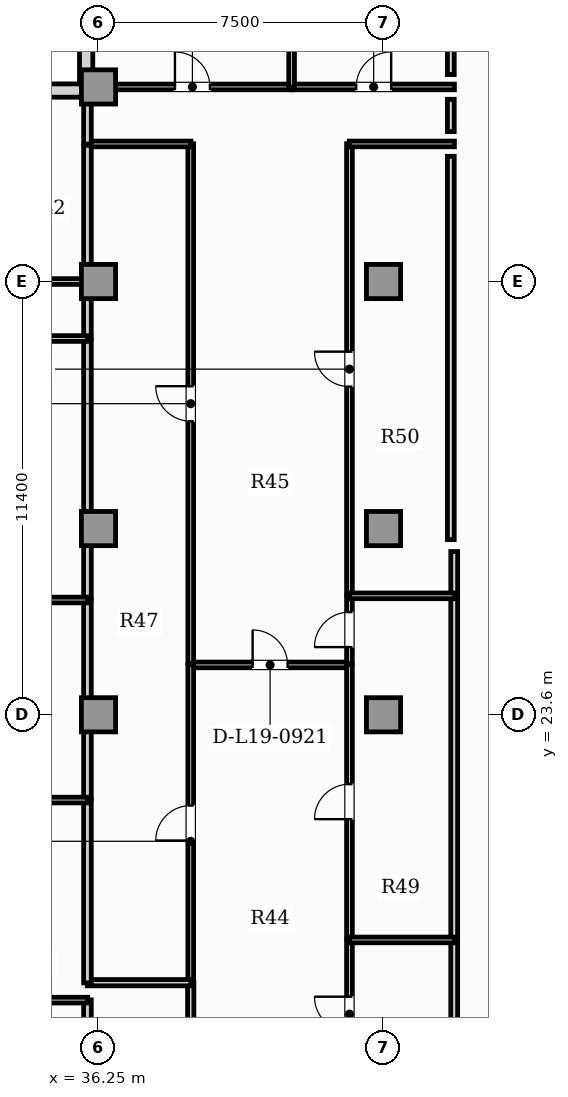
"""IFC4 building model, lengths in metres.
Left out: names, types, materials, properties, quantities, classifications, styles, units other than length and angle.
Written with IfcOpenShell. Run it as: python <this file> out.ifc"""

import sys

from ifc_helpers import new_model, si_unit, direction, frame, frame_2d, origin, origin_2d, place, context, subcontext, project, spatial, rectangle, extrude, element, fill, save


model = new_model("IFC4")
c1 = context("Model", 3, precision=1e-05, world=origin(), true_north=direction((0.0, 1.0)))
c2 = subcontext(c1, "Body", "Model", "MODEL_VIEW")
j1 = project(units=[si_unit("LENGTHUNIT", "METRE"), si_unit("PLANEANGLEUNIT", "RADIAN")], contexts=[c1])
p1 = place(None, origin())
s1 = spatial("IfcSite", under=j1, at=p1, CompositionType="ELEMENT")
p2 = place(p1, origin())
s2 = spatial("IfcBuilding", under=s1, at=p2, CompositionType="ELEMENT")
p3 = place(p2, frame((0.0, 0.0, 81.05)))
s3 = spatial("IfcBuildingStorey", under=s2, at=p3, CompositionType="ELEMENT", Elevation=81.05)
for number, where, z_axis, x_axis in (
    (1, (36.25, 23.6, 0.0), (0.0, 0.0, 1.0), (1.0, 0.0, 0.0)),
    (2, (43.75, 23.6, 0.0), (0.0, 0.0, 1.0), (1.0, 0.0, 0.0)),
    (3, (36.25, 28.5, 0.0), (0.0, 0.0, 1.0), (1.0, 0.0, 0.0)),
    (4, (43.75, 28.5, 0.0), (0.0, 0.0, 1.0), (1.0, 0.0, 0.0)),
    (5, (36.25, 40.12, 0.0), (0.0, 0.0, 1.0), (1.0, 0.0, 0.0)),
    (6, (36.25, 35.0, 0.0), (0.0, 0.0, 1.0), (1.0, 0.0, 0.0)),
    (7, (43.75, 35.0, 0.0), (0.0, 0.0, 1.0), (1.0, 0.0, 0.0)),
):
    element("IfcColumn", number, at=place(p3, frame(where, z_axis=z_axis, x_axis=x_axis)), inside=s3, PredefinedType="COLUMN", context=c2, shape_type="SweptSolid", body=[
        extrude(rectangle(XDim=0.9, YDim=0.9, at=origin_2d()), origin(), (0.0, 0.0, 1.0), 3.85),
    ])
p4 = place(p3, frame((35.925, 46.36, 0.0), z_axis=(0.0, 0.0, 1.0), x_axis=(0.0, -1.0, 0.0)))
e8 = element("IfcWall", 8, at=p4, inside=s3, PredefinedType="SOLIDWALL", context=c2, shape_type="SweptSolid", body=[
    extrude(rectangle(XDim=6.16, YDim=0.35, at=frame_2d((3.08, 0.0))), origin(), (0.0, 0.0, 1.0), 3.6),
])
p5 = place(p3, frame((34.25, 40.025, 0.0), z_axis=(0.0, 0.0, 1.0), x_axis=(1.0, 0.0, 0.0)))
e9 = element("IfcWall", 9, at=p5, inside=s3, PredefinedType="SOLIDWALL", context=c2, shape_type="SweptSolid", body=[
    extrude(rectangle(XDim=1.85, YDim=0.35, at=frame_2d((0.925, 0.0))), origin(), (0.0, 0.0, 1.0), 3.6),
])
p6 = place(p3, frame((45.61, 13.765, 0.0), z_axis=(0.0, 0.0, 1.0), x_axis=(0.0, 1.0, 0.0)))
e10 = element("IfcWall", 10, at=p6, inside=s3, PredefinedType="PARTITIONING", context=c2, shape_type="SweptSolid", body=[
    extrude(rectangle(XDim=3.916, YDim=0.18, at=frame_2d((1.958, 0.0))), origin(), (0.0, 0.0, 1.0), 3.6),
])
p7 = place(p3, frame((45.61, 17.711, 0.0), z_axis=(0.0, 0.0, 1.0), x_axis=(0.0, 1.0, 0.0)))
e11 = element("IfcWall", 11, at=p7, inside=s3, PredefinedType="PARTITIONING", context=c2, shape_type="SweptSolid", body=[
    extrude(rectangle(XDim=9.024, YDim=0.18, at=frame_2d((4.512, 0.0))), origin(), (0.0, 0.0, 1.0), 3.6),
])
p8 = place(p3, frame((45.61, 26.765, 0.0), z_axis=(0.0, 0.0, 1.0), x_axis=(0.0, 1.0, 0.0)))
e12 = element("IfcWall", 12, at=p8, inside=s3, PredefinedType="PARTITIONING", context=c2, shape_type="SweptSolid", body=[
    extrude(rectangle(XDim=1.13, YDim=0.18, at=frame_2d((0.565, 0.0))), origin(), (0.0, 0.0, 1.0), 3.6),
])
p9 = place(p3, frame((38.672, 24.912, 0.0), z_axis=(0.0, 0.0, 1.0), x_axis=(1.0, 0.0, 0.0)))
e13 = element("IfcWall", 13, at=p9, inside=s3, PredefinedType="PARTITIONING", context=c2, shape_type="SweptSolid", body=[
    extrude(rectangle(XDim=4.186, YDim=0.15, at=frame_2d((2.093, 0.0))), origin(), (0.0, 0.0, 1.0), 3.6),
])
p10 = place(p9, frame((1.633, 0.0, 0.0)))
e14 = element("IfcOpeningElement", 14, at=p10, cuts=e13, PredefinedType="OPENING", context=c2, shape_type="SweptSolid", body=[
    extrude(rectangle(XDim=0.92, YDim=2.1, at=frame_2d((0.46, 1.05))), frame((0.0, 0.085, 0.0), z_axis=(0.0, -1.0, 0.0), x_axis=(1.0, 0.0, 0.0)), (0.0, 0.0, 1.0), 0.17),
])
p11 = place(p3, frame((38.677, 13.765, 0.0), z_axis=(0.0, 0.0, 1.0), x_axis=(0.0, 1.0, 0.0)))
e15 = element("IfcWall", 15, at=p11, inside=s3, PredefinedType="PLUMBINGWALL", context=c2, shape_type="SweptSolid", body=[
    extrude(rectangle(XDim=2.792, YDim=0.165, at=frame_2d((1.396, 0.0))), origin(), (0.0, 0.0, 1.0), 3.6),
])
p12 = place(p11, frame((0.971, 0.0, 0.0)))
e16 = element("IfcOpeningElement", 16, at=p12, cuts=e15, PredefinedType="OPENING", context=c2, shape_type="SweptSolid", body=[
    extrude(rectangle(XDim=0.85, YDim=2.1, at=frame_2d((0.425, 1.05))), frame((0.0, 0.093, 0.0), z_axis=(0.0, -1.0, 0.0), x_axis=(1.0, 0.0, 0.0)), (0.0, 0.0, 1.0), 0.185),
])
p13 = place(p3, frame((38.677, 16.586, 0.0), z_axis=(0.0, 0.0, 1.0), x_axis=(0.0, 1.0, 0.0)))
e17 = element("IfcWall", 17, at=p13, inside=s3, PredefinedType="PARTITIONING", context=c2, shape_type="SweptSolid", body=[
    extrude(rectangle(XDim=8.331, YDim=0.15, at=frame_2d((4.166, 0.0))), origin(), (0.0, 0.0, 1.0), 3.6),
])
p14 = place(p13, frame((3.705, 0.0, 0.0)))
e18 = element("IfcOpeningElement", 18, at=p14, cuts=e17, PredefinedType="OPENING", context=c2, shape_type="SweptSolid", body=[
    extrude(rectangle(XDim=0.92, YDim=2.1, at=frame_2d((0.46, 1.05))), frame((0.0, 0.085, 0.0), z_axis=(0.0, -1.0, 0.0), x_axis=(1.0, 0.0, 0.0)), (0.0, 0.0, 1.0), 0.17),
])
p15 = place(p3, frame((42.854, 13.765, 0.0), z_axis=(0.0, 0.0, 1.0), x_axis=(0.0, 1.0, 0.0)))
e19 = element("IfcWall", 19, at=p15, inside=s3, PredefinedType="PARTITIONING", context=c2, shape_type="SweptSolid", body=[
    extrude(rectangle(XDim=3.916, YDim=0.15, at=frame_2d((1.958, 0.0))), origin(), (0.0, 0.0, 1.0), 3.6),
])
p16 = place(p15, frame((1.498, 0.0, 0.0)))
e20 = element("IfcOpeningElement", 20, at=p16, cuts=e19, PredefinedType="OPENING", context=c2, shape_type="SweptSolid", body=[
    extrude(rectangle(XDim=0.92, YDim=2.1, at=frame_2d((0.46, 1.05))), frame((0.0, 0.085, 0.0), z_axis=(0.0, -1.0, 0.0), x_axis=(1.0, 0.0, 0.0)), (0.0, 0.0, 1.0), 0.17),
])
p17 = place(p3, frame((42.854, 17.711, 0.0), z_axis=(0.0, 0.0, 1.0), x_axis=(0.0, 1.0, 0.0)))
e21 = element("IfcWall", 21, at=p17, inside=s3, PredefinedType="PARTITIONING", context=c2, shape_type="SweptSolid", body=[
    extrude(rectangle(XDim=7.206, YDim=0.15, at=frame_2d((3.603, 0.0))), origin(), (0.0, 0.0, 1.0), 3.6),
])
p18 = place(p17, frame((3.143, 0.0, 0.0)))
e22 = element("IfcOpeningElement", 22, at=p18, cuts=e21, PredefinedType="OPENING", context=c2, shape_type="SweptSolid", body=[
    extrude(rectangle(XDim=0.92, YDim=2.1, at=frame_2d((0.46, 1.05))), frame((0.0, 0.085, 0.0), z_axis=(0.0, -1.0, 0.0), x_axis=(1.0, 0.0, 0.0)), (0.0, 0.0, 1.0), 0.17),
])
p19 = place(p3, frame((38.677, 24.947, 0.0), z_axis=(0.0, 0.0, 1.0), x_axis=(0.0, 1.0, 0.0)))
e23 = element("IfcWall", 23, at=p19, inside=s3, PredefinedType="PARTITIONING", context=c2, shape_type="SweptSolid", body=[
    extrude(rectangle(XDim=13.678, YDim=0.15, at=frame_2d((6.839, 0.0))), origin(), (0.0, 0.0, 1.0), 3.6),
])
p20 = place(p19, frame((6.379, 0.0, 0.0)))
e24 = element("IfcOpeningElement", 24, at=p20, cuts=e23, PredefinedType="OPENING", context=c2, shape_type="SweptSolid", body=[
    extrude(rectangle(XDim=0.92, YDim=2.1, at=frame_2d((0.46, 1.05))), frame((0.0, 0.085, 0.0), z_axis=(0.0, -1.0, 0.0), x_axis=(1.0, 0.0, 0.0)), (0.0, 0.0, 1.0), 0.17),
])
p21 = place(p3, frame((35.955, 38.62, 0.0), z_axis=(0.0, 0.0, 1.0), x_axis=(1.0, 0.0, 0.0)))
e25 = element("IfcWall", 25, at=p21, inside=s3, PredefinedType="PARTITIONING", context=c2, shape_type="SweptSolid", body=[
    extrude(rectangle(XDim=2.727, YDim=0.15, at=frame_2d((1.364, 0.0))), origin(), (0.0, 0.0, 1.0), 3.6),
])
p22 = place(p3, frame((42.854, 24.947, 0.0), z_axis=(0.0, 0.0, 1.0), x_axis=(0.0, 1.0, 0.0)))
e26 = element("IfcWall", 26, at=p22, inside=s3, PredefinedType="PARTITIONING", context=c2, shape_type="SweptSolid", body=[
    extrude(rectangle(XDim=1.788, YDim=0.15, at=frame_2d((0.894, 0.0))), origin(), (0.0, 0.0, 1.0), 3.6),
])
p23 = place(p22, frame((0.434, 0.0, 0.0)))
e27 = element("IfcOpeningElement", 27, at=p23, cuts=e26, PredefinedType="OPENING", context=c2, shape_type="SweptSolid", body=[
    extrude(rectangle(XDim=0.92, YDim=2.1, at=frame_2d((0.46, 1.05))), frame((0.0, 0.085, 0.0), z_axis=(0.0, -1.0, 0.0), x_axis=(1.0, 0.0, 0.0)), (0.0, 0.0, 1.0), 0.17),
])
p24 = place(p3, frame((42.854, 26.765, 0.0), z_axis=(0.0, 0.0, 1.0), x_axis=(0.0, 1.0, 0.0)))
e28 = element("IfcWall", 28, at=p24, inside=s3, PredefinedType="PARTITIONING", context=c2, shape_type="SweptSolid", body=[
    extrude(rectangle(XDim=11.86, YDim=0.15, at=frame_2d((5.93, 0.0))), origin(), (0.0, 0.0, 1.0), 3.6),
])
p25 = place(p24, frame((5.47, 0.0, 0.0)))
e29 = element("IfcOpeningElement", 29, at=p25, cuts=e28, PredefinedType="OPENING", context=c2, shape_type="SweptSolid", body=[
    extrude(rectangle(XDim=0.92, YDim=2.1, at=frame_2d((0.46, 1.05))), frame((0.0, 0.085, 0.0), z_axis=(0.0, -1.0, 0.0), x_axis=(1.0, 0.0, 0.0)), (0.0, 0.0, 1.0), 0.17),
])
p26 = place(p3, frame((42.848, 38.62, 0.0), z_axis=(0.0, 0.0, 1.0), x_axis=(1.0, 0.0, 0.0)))
e30 = element("IfcWall", 30, at=p26, inside=s3, PredefinedType="PARTITIONING", context=c2, shape_type="SweptSolid", body=[
    extrude(rectangle(XDim=2.767, YDim=0.15, at=frame_2d((1.383, 0.0))), origin(), (0.0, 0.0, 1.0), 3.6),
])
p27 = place(p3, frame((36.107, 40.12, 0.0), z_axis=(0.0, 0.0, 1.0), x_axis=(1.0, 0.0, 0.0)))
e31 = element("IfcWall", 31, at=p27, inside=s3, PredefinedType="PARTITIONING", context=c2, shape_type="SweptSolid", body=[
    extrude(rectangle(XDim=5.23, YDim=0.15, at=frame_2d((2.615, 0.0))), origin(), (0.0, 0.0, 1.0), 3.6),
])
p28 = place(p27, frame((2.155, 0.0, 0.0)))
e32 = element("IfcOpeningElement", 32, at=p28, cuts=e31, PredefinedType="OPENING", context=c2, shape_type="SweptSolid", body=[
    extrude(rectangle(XDim=0.92, YDim=2.1, at=frame_2d((0.46, 1.05))), frame((0.0, 0.085, 0.0), z_axis=(0.0, -1.0, 0.0), x_axis=(1.0, 0.0, 0.0)), (0.0, 0.0, 1.0), 0.17),
])
p29 = place(p3, frame((41.366, 40.12, 0.0), z_axis=(0.0, 0.0, 1.0), x_axis=(1.0, 0.0, 0.0)))
e33 = element("IfcWall", 33, at=p29, inside=s3, PredefinedType="PARTITIONING", context=c2, shape_type="SweptSolid", body=[
    extrude(rectangle(XDim=4.249, YDim=0.15, at=frame_2d((2.124, 0.0))), origin(), (0.0, 0.0, 1.0), 3.6),
])
p30 = place(p29, frame((1.664, 0.0, 0.0)))
e34 = element("IfcOpeningElement", 34, at=p30, cuts=e33, PredefinedType="OPENING", context=c2, shape_type="SweptSolid", body=[
    extrude(rectangle(XDim=0.92, YDim=2.1, at=frame_2d((0.46, 1.05))), frame((0.0, 0.085, 0.0), z_axis=(0.0, -1.0, 0.0), x_axis=(1.0, 0.0, 0.0)), (0.0, 0.0, 1.0), 0.17),
])
p31 = place(p3, frame((35.96, 38.615, 0.0), z_axis=(0.0, 0.0, 1.0), x_axis=(0.0, 1.0, 0.0)))
e35 = element("IfcWall", 35, at=p31, inside=s3, PredefinedType="PARTITIONING", context=c2, shape_type="SweptSolid", body=[
    extrude(rectangle(XDim=1.375, YDim=0.2, at=frame_2d((0.688, 0.0))), origin(), (0.0, 0.0, 1.0), 3.6),
])
p32 = place(p3, frame((35.955, 16.551, 0.0), z_axis=(0.0, 0.0, 1.0), x_axis=(1.0, 0.0, 0.0)))
e36 = element("IfcWall", 36, at=p32, inside=s3, PredefinedType="PLUMBINGWALL", context=c2, shape_type="SweptSolid", body=[
    extrude(rectangle(XDim=2.727, YDim=0.165, at=frame_2d((1.364, 0.0))), origin(), (0.0, 0.0, 1.0), 3.6),
])
p33 = place(p3, frame((35.96, 13.765, 0.0), z_axis=(0.0, 0.0, 1.0), x_axis=(0.0, 1.0, 0.0)))
e37 = element("IfcWall", 37, at=p33, inside=s3, PredefinedType="PARTITIONING", context=c2, shape_type="SweptSolid", body=[
    extrude(rectangle(XDim=2.333, YDim=0.2, at=frame_2d((1.166, 0.0))), origin(), (0.0, 0.0, 1.0), 3.6),
])
p34 = place(p3, frame((35.96, 33.495, 0.0), z_axis=(0.0, 0.0, 1.0), x_axis=(0.0, 1.0, 0.0)))
e38 = element("IfcWall", 38, at=p34, inside=s3, PredefinedType="PARTITIONING", context=c2, shape_type="SweptSolid", body=[
    extrude(rectangle(XDim=1.51, YDim=0.2, at=frame_2d((0.755, 0.0))), origin(), (0.0, 0.0, 1.0), 3.6),
])
p35 = place(p3, frame((35.96, 16.546, 0.0), z_axis=(0.0, 0.0, 1.0), x_axis=(0.0, 1.0, 0.0)))
e39 = element("IfcWall", 39, at=p35, inside=s3, PredefinedType="PARTITIONING", context=c2, shape_type="SweptSolid", body=[
    extrude(rectangle(XDim=4.815, YDim=0.2, at=frame_2d((2.407, 0.0))), origin(), (0.0, 0.0, 1.0), 3.6),
])
p36 = place(p3, frame((35.96, 21.391, 0.0), z_axis=(0.0, 0.0, 1.0), x_axis=(0.0, 1.0, 0.0)))
e40 = element("IfcWall", 40, at=p36, inside=s3, PredefinedType="PARTITIONING", context=c2, shape_type="SweptSolid", body=[
    extrude(rectangle(XDim=5.234, YDim=0.2, at=frame_2d((2.617, 0.0))), origin(), (0.0, 0.0, 1.0), 3.6),
])
p37 = place(p3, frame((35.96, 26.655, 0.0), z_axis=(0.0, 0.0, 1.0), x_axis=(0.0, 1.0, 0.0)))
e41 = element("IfcWall", 41, at=p37, inside=s3, PredefinedType="PARTITIONING", context=c2, shape_type="SweptSolid", body=[
    extrude(rectangle(XDim=6.81, YDim=0.2, at=frame_2d((3.405, 0.0))), origin(), (0.0, 0.0, 1.0), 3.6),
])
p38 = place(p3, frame((35.96, 35.035, 0.0), z_axis=(0.0, 0.0, 1.0), x_axis=(0.0, 1.0, 0.0)))
e42 = element("IfcWall", 42, at=p38, inside=s3, PredefinedType="PARTITIONING", context=c2, shape_type="SweptSolid", body=[
    extrude(rectangle(XDim=3.55, YDim=0.2, at=frame_2d((1.775, 0.0))), origin(), (0.0, 0.0, 1.0), 3.6),
])
for number, where, z_axis, x_axis in (
    (43, (42.848, 17.676, 0.0), (0.0, 0.0, 1.0), (1.0, 0.0, 0.0)),
    (44, (42.848, 26.73, 0.0), (0.0, 0.0, 1.0), (1.0, 0.0, 0.0)),
):
    element("IfcWall", number, at=place(p3, frame(where, z_axis=z_axis, x_axis=x_axis)), inside=s3, PredefinedType="PARTITIONING", context=c2, shape_type="SweptSolid", body=[
        extrude(rectangle(XDim=2.767, YDim=0.15, at=frame_2d((1.383, 0.0))), origin(), (0.0, 0.0, 1.0), 3.6),
    ])
p39 = place(p3, frame((41.332, 40.115, 0.0), z_axis=(0.0, 0.0, 1.0), x_axis=(0.0, 1.0, 0.0)))
e45 = element("IfcWall", 45, at=p39, inside=s3, PredefinedType="PARTITIONING", context=c2, shape_type="SweptSolid", body=[
    extrude(rectangle(XDim=6.075, YDim=0.15, at=frame_2d((3.038, 0.0))), origin(), (0.0, 0.0, 1.0), 3.6),
])
p40 = place(p3, frame((31.294, 33.5, 0.0), z_axis=(0.0, 0.0, 1.0), x_axis=(1.0, 0.0, 0.0)))
e46 = element("IfcWall", 46, at=p40, inside=s3, PredefinedType="PARTITIONING", context=c2, shape_type="SweptSolid", body=[
    extrude(rectangle(XDim=4.671, YDim=0.15, at=frame_2d((2.335, 0.0))), origin(), (0.0, 0.0, 1.0), 3.6),
])
p41 = place(p3, frame((31.767, 35.0, 0.0), z_axis=(0.0, 0.0, 1.0), x_axis=(1.0, 0.0, 0.0)))
e47 = element("IfcWall", 47, at=p41, inside=s3, PredefinedType="PARTITIONING", context=c2, shape_type="SweptSolid", body=[
    extrude(rectangle(XDim=4.198, YDim=0.15, at=frame_2d((2.099, 0.0))), origin(), (0.0, 0.0, 1.0), 2.964),
])
p42 = place(p41, frame((1.639, 0.0, 0.0)))
e48 = element("IfcOpeningElement", 48, at=p42, cuts=e47, PredefinedType="OPENING", context=c2, shape_type="SweptSolid", body=[
    extrude(rectangle(XDim=0.92, YDim=2.1, at=frame_2d((0.46, 1.05))), frame((0.0, 0.085, 0.0), z_axis=(0.0, -1.0, 0.0), x_axis=(1.0, 0.0, 0.0)), (0.0, 0.0, 1.0), 0.17),
])
for number, where, z_axis, x_axis in (
    (49, (31.294, 16.093, 0.0), (0.0, 0.0, 1.0), (1.0, 0.0, 0.0)),
    (50, (31.294, 21.356, 0.0), (0.0, 0.0, 1.0), (1.0, 0.0, 0.0)),
    (51, (31.294, 26.62, 0.0), (0.0, 0.0, 1.0), (1.0, 0.0, 0.0)),
):
    element("IfcWall", number, at=place(p3, frame(where, z_axis=z_axis, x_axis=x_axis)), inside=s3, PredefinedType="PARTITIONING", context=c2, shape_type="SweptSolid", body=[
        extrude(rectangle(XDim=4.671, YDim=0.15, at=frame_2d((2.335, 0.0))), origin(), (0.0, 0.0, 1.0), 3.6),
    ])
p43 = place(p3, frame((45.52, 39.795, 0.0), z_axis=(0.0, 0.0, 1.0), x_axis=(0.0, -1.0, 0.0)))
e52 = element("IfcWall", 52, at=p43, inside=s3, PredefinedType="PARTITIONING", context=c2, shape_type="SweptSolid", body=[
    extrude(rectangle(XDim=0.85, YDim=0.18, at=frame_2d((0.425, 0.0))), origin(), (0.0, 0.0, 1.0), 3.6),
])
p44 = place(p3, frame((45.52, 38.295, 0.0), z_axis=(0.0, 0.0, 1.0), x_axis=(0.0, -1.0, 0.0)))
e53 = element("IfcWall", 53, at=p44, inside=s3, PredefinedType="PARTITIONING", context=c2, shape_type="SweptSolid", body=[
    extrude(rectangle(XDim=10.085, YDim=0.18, at=frame_2d((5.042, 0.0))), origin(), (0.0, 0.0, 1.0), 3.6),
])
p45 = place(p3, frame((45.52, 46.19, 0.0), z_axis=(0.0, 0.0, 1.0), x_axis=(0.0, -1.0, 0.0)))
e54 = element("IfcWall", 54, at=p45, inside=s3, PredefinedType="PARTITIONING", context=c2, shape_type="SweptSolid", body=[
    extrude(rectangle(XDim=5.745, YDim=0.18, at=frame_2d((2.873, 0.0))), origin(), (0.0, 0.0, 1.0), 3.6),
])
p46 = place(p10, origin())
e55 = element("IfcDoor", 55, at=p46, inside=s3, OperationType="SINGLE_SWING_LEFT", PredefinedType="DOOR", context=c2, shape_type="SweptSolid", body=[
    extrude(rectangle(XDim=0.92, YDim=2.1, at=frame_2d((0.46, 1.05))), frame((0.0, 0.025, 0.0), z_axis=(0.0, -1.0, 0.0), x_axis=(1.0, 0.0, 0.0)), (0.0, 0.0, 1.0), 0.05),
])
fill(e14, e55)
p47 = place(p14, origin())
e56 = element("IfcDoor", 56, at=p47, inside=s3, OperationType="SINGLE_SWING_LEFT", PredefinedType="DOOR", context=c2, shape_type="SweptSolid", body=[
    extrude(rectangle(XDim=0.92, YDim=2.1, at=frame_2d((0.46, 1.05))), frame((0.0, 0.025, 0.0), z_axis=(0.0, -1.0, 0.0), x_axis=(1.0, 0.0, 0.0)), (0.0, 0.0, 1.0), 0.05),
])
fill(e18, e56)
p48 = place(p16, origin())
e57 = element("IfcDoor", 57, at=p48, inside=s3, OperationType="SINGLE_SWING_RIGHT", PredefinedType="DOOR", context=c2, shape_type="SweptSolid", body=[
    extrude(rectangle(XDim=0.92, YDim=2.1, at=frame_2d((0.46, 1.05))), frame((0.0, 0.025, 0.0), z_axis=(0.0, -1.0, 0.0), x_axis=(1.0, 0.0, 0.0)), (0.0, 0.0, 1.0), 0.05),
])
fill(e20, e57)
p49 = place(p18, origin())
e58 = element("IfcDoor", 58, at=p49, inside=s3, OperationType="SINGLE_SWING_LEFT", PredefinedType="DOOR", context=c2, shape_type="SweptSolid", body=[
    extrude(rectangle(XDim=0.92, YDim=2.1, at=frame_2d((0.46, 1.05))), frame((0.0, 0.025, 0.0), z_axis=(0.0, -1.0, 0.0), x_axis=(1.0, 0.0, 0.0)), (0.0, 0.0, 1.0), 0.05),
])
fill(e22, e58)
p50 = place(p20, origin())
e59 = element("IfcDoor", 59, at=p50, inside=s3, OperationType="SINGLE_SWING_RIGHT", PredefinedType="DOOR", context=c2, shape_type="SweptSolid", body=[
    extrude(rectangle(XDim=0.92, YDim=2.1, at=frame_2d((0.46, 1.05))), frame((0.0, 0.025, 0.0), z_axis=(0.0, -1.0, 0.0), x_axis=(1.0, 0.0, 0.0)), (0.0, 0.0, 1.0), 0.05),
])
fill(e24, e59)
p51 = place(p23, origin())
e60 = element("IfcDoor", 60, at=p51, inside=s3, OperationType="SINGLE_SWING_LEFT", PredefinedType="DOOR", context=c2, shape_type="SweptSolid", body=[
    extrude(rectangle(XDim=0.92, YDim=2.1, at=frame_2d((0.46, 1.05))), frame((0.0, 0.025, 0.0), z_axis=(0.0, -1.0, 0.0), x_axis=(1.0, 0.0, 0.0)), (0.0, 0.0, 1.0), 0.05),
])
fill(e27, e60)
p52 = place(p25, origin())
e61 = element("IfcDoor", 61, at=p52, inside=s3, OperationType="SINGLE_SWING_RIGHT", PredefinedType="DOOR", context=c2, shape_type="SweptSolid", body=[
    extrude(rectangle(XDim=0.92, YDim=2.1, at=frame_2d((0.46, 1.05))), frame((0.0, 0.025, 0.0), z_axis=(0.0, -1.0, 0.0), x_axis=(1.0, 0.0, 0.0)), (0.0, 0.0, 1.0), 0.05),
])
fill(e29, e61)
p53 = place(p28, origin())
e62 = element("IfcDoor", 62, at=p53, inside=s3, OperationType="SINGLE_SWING_LEFT", PredefinedType="DOOR", context=c2, shape_type="SweptSolid", body=[
    extrude(rectangle(XDim=0.92, YDim=2.1, at=frame_2d((0.46, 1.05))), frame((0.0, 0.025, 0.0), z_axis=(0.0, -1.0, 0.0), x_axis=(1.0, 0.0, 0.0)), (0.0, 0.0, 1.0), 0.05),
])
fill(e32, e62)
p54 = place(p30, origin())
e63 = element("IfcDoor", 63, at=p54, inside=s3, OperationType="SINGLE_SWING_RIGHT", PredefinedType="DOOR", context=c2, shape_type="SweptSolid", body=[
    extrude(rectangle(XDim=0.92, YDim=2.1, at=frame_2d((0.46, 1.05))), frame((0.0, 0.025, 0.0), z_axis=(0.0, -1.0, 0.0), x_axis=(1.0, 0.0, 0.0)), (0.0, 0.0, 1.0), 0.05),
])
fill(e34, e63)
save(model, sys.argv[1])
